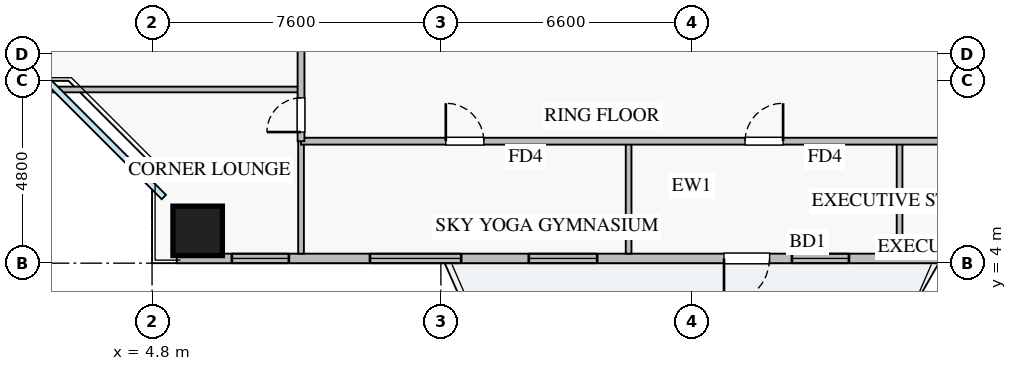
"""IFC4 building model, lengths in metres.
Left out: names, types, materials, properties, quantities, classifications, styles, units other than length and angle.
Written with IfcOpenShell. Run it as: python <this file> out.ifc"""

import sys

from ifc_helpers import new_model, si_unit, direction, frame, frame_2d, origin, origin_2d, place, context, subcontext, project, spatial, rectangle, extrude, source, transform, mapped, element, fill, save


model = new_model("IFC4")
c1 = context("Model", 3, precision=1e-05, world=origin(), true_north=direction((0.0, 1.0)))
c2 = subcontext(c1, "Body", "Model", "MODEL_VIEW")
j1 = project(units=[si_unit("LENGTHUNIT", "METRE"), si_unit("PLANEANGLEUNIT", "RADIAN")], contexts=[c1])
p1 = place(None, origin())
s1 = spatial("IfcSite", under=j1, at=p1, CompositionType="ELEMENT")
p2 = place(p1, origin())
s2 = spatial("IfcBuilding", under=s1, at=p2, CompositionType="ELEMENT")
p3 = place(p2, frame((0.0, 0.0, 86.0)))
s3 = spatial("IfcBuildingStorey", under=s2, at=p3, CompositionType="ELEMENT", Elevation=86.0)
m1 = source(origin(), c2, "Body", "SweptSolid", [
    extrude(rectangle(XDim=1.3, YDim=1.3, at=origin_2d()), origin(), (0.0, 0.0, 1.0), 3.25),
])
p4 = place(p3, frame((6.0, 4.85, 0.0), z_axis=(0.0, 0.0, 1.0), x_axis=(1.0, 0.0, 0.0)))
e1 = element("IfcColumn", 1, at=p4, inside=s3, PredefinedType="COLUMN", context=c2, shape_type="MappedRepresentation", body=[
    mapped(m1, transform((0.0, 0.0, 0.0), x_axis=(1.0, 0.0, 0.0), y_axis=(0.0, 1.0, 0.0), z_axis=(0.0, 0.0, 1.0), scale=1.0)),
])
p5 = place(p3, frame((5.45, 4.125, 0.0), z_axis=(0.0, 0.0, 1.0), x_axis=(1.0, 0.0, 0.0)))
e2 = element("IfcWall", 2, at=p5, inside=s3, PredefinedType="STANDARD", context=c2, shape_type="SweptSolid", body=[
    extrude(rectangle(XDim=27.1, YDim=0.25, at=frame_2d((13.55, 0.0))), origin(), (0.0, 0.0, 1.0), 2.61),
])
p6 = place(p5, frame((14.4, 0.0, 0.0)))
e3 = element("IfcOpeningElement", 3, at=p6, cuts=e2, PredefinedType="OPENING", context=c2, shape_type="SweptSolid", body=[
    extrude(rectangle(XDim=1.2, YDim=2.1, at=frame_2d((0.6, 1.05))), frame((0.0, 0.135, 0.0), z_axis=(0.0, -1.0, 0.0), x_axis=(1.0, 0.0, 0.0)), (0.0, 0.0, 1.0), 0.27),
])
p7 = place(p5, frame((1.45, 0.0, 0.9)))
e4 = element("IfcOpeningElement", 4, at=p7, cuts=e2, PredefinedType="OPENING", context=c2, shape_type="SweptSolid", body=[
    extrude(rectangle(XDim=1.5, YDim=1.5, at=frame_2d((0.75, 0.75))), frame((0.0, 0.135, 0.0), z_axis=(0.0, -1.0, 0.0), x_axis=(1.0, 0.0, 0.0)), (0.0, 0.0, 1.0), 0.27),
])
p8 = place(p5, frame((9.263, 0.0, 0.9)))
e5 = element("IfcOpeningElement", 5, at=p8, cuts=e2, PredefinedType="OPENING", context=c2, shape_type="SweptSolid", body=[
    extrude(rectangle(XDim=1.8, YDim=1.45, at=frame_2d((0.9, 0.725))), frame((0.0, 0.135, 0.0), z_axis=(0.0, -1.0, 0.0), x_axis=(1.0, 0.0, 0.0)), (0.0, 0.0, 1.0), 0.27),
])
p9 = place(p5, frame((16.188, 0.0, 0.9)))
e6 = element("IfcOpeningElement", 6, at=p9, cuts=e2, PredefinedType="OPENING", context=c2, shape_type="SweptSolid", body=[
    extrude(rectangle(XDim=1.5, YDim=1.45, at=frame_2d((0.75, 0.725))), frame((0.0, 0.135, 0.0), z_axis=(0.0, -1.0, 0.0), x_axis=(1.0, 0.0, 0.0)), (0.0, 0.0, 1.0), 0.27),
])
p10 = place(p5, frame((22.663, 0.0, 0.9)))
e7 = element("IfcOpeningElement", 7, at=p10, cuts=e2, PredefinedType="OPENING", context=c2, shape_type="SweptSolid", body=[
    extrude(rectangle(XDim=2.1, YDim=1.48, at=frame_2d((1.05, 0.74))), frame((0.0, 0.135, 0.0), z_axis=(0.0, -1.0, 0.0), x_axis=(1.0, 0.0, 0.0)), (0.0, 0.0, 1.0), 0.27),
])
p11 = place(p5, frame((5.084, 0.0, 0.9)))
e8 = element("IfcOpeningElement", 8, at=p11, cuts=e2, PredefinedType="OPENING", context=c2, shape_type="SweptSolid", body=[
    extrude(rectangle(XDim=2.4, YDim=1.5, at=frame_2d((1.2, 0.75))), frame((0.0, 0.135, 0.0), z_axis=(0.0, -1.0, 0.0), x_axis=(1.0, 0.0, 0.0)), (0.0, 0.0, 1.0), 0.27),
])
for number, where, z_axis, x_axis in (
    (9, (17.34, 4.25, 0.0), (0.0, 0.0, 1.0), (0.0, 1.0, 0.0)),
    (10, (24.47, 4.25, 0.0), (0.0, 0.0, 1.0), (0.0, 1.0, 0.0)),
    (11, (8.72, 4.25, 0.0), (0.0, 0.0, 1.0), (0.0, 1.0, 0.0)),
):
    element("IfcWall", number, at=place(p3, frame(where, z_axis=z_axis, x_axis=x_axis)), inside=s3, PredefinedType="PARTITIONING", context=c2, shape_type="SweptSolid", body=[
        extrude(rectangle(XDim=2.96, YDim=0.15, at=frame_2d((1.48, 0.0))), origin(), (0.0, 0.0, 1.0), 3.07),
    ])
p12 = place(p3, frame((8.72, 7.21, 0.0), z_axis=(0.0, 0.0, 1.0), x_axis=(1.0, 0.0, 0.0)))
e12 = element("IfcWall", 12, at=p12, inside=s3, PredefinedType="PARTITIONING", context=c2, shape_type="SweptSolid", body=[
    extrude(rectangle(XDim=23.63, YDim=0.18, at=frame_2d((11.815, 0.0))), origin(), (0.0, 0.0, 1.0), 3.07),
])
p13 = place(p12, frame((3.81, 0.0, 0.0)))
e13 = element("IfcOpeningElement", 13, at=p13, cuts=e12, PredefinedType="OPENING", context=c2, shape_type="SweptSolid", body=[
    extrude(rectangle(XDim=1.0, YDim=2.05, at=frame_2d((0.5, 1.025))), frame((0.0, 0.1, 0.0), z_axis=(0.0, -1.0, 0.0), x_axis=(1.0, 0.0, 0.0)), (0.0, 0.0, 1.0), 0.2),
])
p14 = place(p12, frame((11.685, 0.0, 0.0)))
e14 = element("IfcOpeningElement", 14, at=p14, cuts=e12, PredefinedType="OPENING", context=c2, shape_type="SweptSolid", body=[
    extrude(rectangle(XDim=1.0, YDim=2.05, at=frame_2d((0.5, 1.025))), frame((0.0, 0.1, 0.0), z_axis=(0.0, -1.0, 0.0), x_axis=(1.0, 0.0, 0.0)), (0.0, 0.0, 1.0), 0.2),
])
p15 = place(p12, frame((19.19, 0.0, 0.0)))
e15 = element("IfcOpeningElement", 15, at=p15, cuts=e12, PredefinedType="OPENING", context=c2, shape_type="SweptSolid", body=[
    extrude(rectangle(XDim=1.0, YDim=2.05, at=frame_2d((0.5, 1.025))), frame((0.0, 0.1, 0.0), z_axis=(0.0, -1.0, 0.0), x_axis=(1.0, 0.0, 0.0)), (0.0, 0.0, 1.0), 0.2),
])
p16 = place(p3, frame((0.25, 8.57, 0.0), z_axis=(0.0, 0.0, 1.0), x_axis=(1.0, 0.0, 0.0)))
e16 = element("IfcWall", 16, at=p16, inside=s3, PredefinedType="PARTITIONING", context=c2, shape_type="SweptSolid", body=[
    extrude(rectangle(XDim=8.47, YDim=0.15, at=frame_2d((4.235, 0.0))), origin(), (0.0, 0.0, 1.0), 3.07),
])
p17 = place(p3, frame((8.72, 7.21, 0.0), z_axis=(0.0, 0.0, 1.0), x_axis=(0.0, 1.0, 0.0)))
e17 = element("IfcWall", 17, at=p17, inside=s3, PredefinedType="PARTITIONING", context=c2, shape_type="SweptSolid", body=[
    extrude(rectangle(XDim=31.23, YDim=0.18, at=frame_2d((15.615, 0.0))), origin(), (0.0, 0.0, 1.0), 3.07),
])
p18 = place(p17, frame((30.09, 0.0, 0.0)))
e18 = element("IfcOpeningElement", 18, at=p18, cuts=e17, PredefinedType="OPENING", context=c2, shape_type="SweptSolid", body=[
    extrude(rectangle(XDim=0.9, YDim=2.05, at=frame_2d((0.45, 1.025))), frame((0.0, 0.1, 0.0), z_axis=(0.0, -1.0, 0.0), x_axis=(1.0, 0.0, 0.0)), (0.0, 0.0, 1.0), 0.2),
])
p19 = place(p17, frame((0.24, 0.0, 0.0)))
e19 = element("IfcOpeningElement", 19, at=p19, cuts=e17, PredefinedType="OPENING", context=c2, shape_type="SweptSolid", body=[
    extrude(rectangle(XDim=0.9, YDim=2.05, at=frame_2d((0.45, 1.025))), frame((0.0, 0.1, 0.0), z_axis=(0.0, -1.0, 0.0), x_axis=(1.0, 0.0, 0.0)), (0.0, 0.0, 1.0), 0.2),
])
p20 = place(p17, frame((3.07, 0.0, 0.0)))
e20 = element("IfcOpeningElement", 20, at=p20, cuts=e17, PredefinedType="OPENING", context=c2, shape_type="SweptSolid", body=[
    extrude(rectangle(XDim=1.0, YDim=2.05, at=frame_2d((0.5, 1.025))), frame((0.0, 0.1, 0.0), z_axis=(0.0, -1.0, 0.0), x_axis=(1.0, 0.0, 0.0)), (0.0, 0.0, 1.0), 0.2),
])
p21 = place(p17, frame((15.37, 0.0, 0.0)))
e21 = element("IfcOpeningElement", 21, at=p21, cuts=e17, PredefinedType="OPENING", context=c2, shape_type="SweptSolid", body=[
    extrude(rectangle(XDim=1.0, YDim=2.05, at=frame_2d((0.5, 1.025))), frame((0.0, 0.1, 0.0), z_axis=(0.0, -1.0, 0.0), x_axis=(1.0, 0.0, 0.0)), (0.0, 0.0, 1.0), 0.2),
])
p22 = place(p17, frame((21.96, 0.0, 0.0)))
e22 = element("IfcOpeningElement", 22, at=p22, cuts=e17, PredefinedType="OPENING", context=c2, shape_type="SweptSolid", body=[
    extrude(rectangle(XDim=1.0, YDim=2.05, at=frame_2d((0.5, 1.025))), frame((0.0, 0.1, 0.0), z_axis=(0.0, -1.0, 0.0), x_axis=(1.0, 0.0, 0.0)), (0.0, 0.0, 1.0), 0.2),
])
m2 = source(origin(), c2, "Body", "SweptSolid", [
    extrude(rectangle(XDim=1.2, YDim=2.1, at=frame_2d((0.6, 1.05))), frame((0.0, 0.025, 0.0), z_axis=(0.0, -1.0, 0.0), x_axis=(1.0, 0.0, 0.0)), (0.0, 0.0, 1.0), 0.05),
])
p23 = place(p6, frame((1.2, 0.0, 0.0), z_axis=(0.0, 0.0, 1.0), x_axis=(-1.0, 0.0, 0.0)))
e23 = element("IfcDoor", 23, at=p23, inside=s3, OperationType="SINGLE_SWING_LEFT", PredefinedType="DOOR", context=c2, shape_type="MappedRepresentation", body=[
    mapped(m2, transform((0.0, 0.0, 0.0), x_axis=(1.0, 0.0, 0.0), y_axis=(0.0, 1.0, 0.0), z_axis=(0.0, 0.0, 1.0), scale=1.0)),
])
fill(e3, e23)
m3 = source(origin(), c2, "Body", "SweptSolid", [
    extrude(rectangle(XDim=1.5, YDim=1.5, at=frame_2d((0.75, 0.75))), frame((0.0, 0.03, 0.0), z_axis=(0.0, -1.0, 0.0), x_axis=(1.0, 0.0, 0.0)), (0.0, 0.0, 1.0), 0.06),
])
p24 = place(p7, origin())
e24 = element("IfcWindow", 24, at=p24, inside=s3, PartitioningType="TRIPLE_PANEL_VERTICAL", PredefinedType="WINDOW", context=c2, shape_type="MappedRepresentation", body=[
    mapped(m3, transform((0.0, 0.0, 0.0), x_axis=(1.0, 0.0, 0.0), y_axis=(0.0, 1.0, 0.0), z_axis=(0.0, 0.0, 1.0), scale=1.0)),
])
fill(e4, e24)
m4 = source(origin(), c2, "Body", "SweptSolid", [
    extrude(rectangle(XDim=1.8, YDim=1.45, at=frame_2d((0.9, 0.725))), frame((0.0, 0.03, 0.0), z_axis=(0.0, -1.0, 0.0), x_axis=(1.0, 0.0, 0.0)), (0.0, 0.0, 1.0), 0.06),
])
p25 = place(p8, origin())
e25 = element("IfcWindow", 25, at=p25, inside=s3, PartitioningType="DOUBLE_PANEL_VERTICAL", PredefinedType="WINDOW", context=c2, shape_type="MappedRepresentation", body=[
    mapped(m4, transform((0.0, 0.0, 0.0), x_axis=(1.0, 0.0, 0.0), y_axis=(0.0, 1.0, 0.0), z_axis=(0.0, 0.0, 1.0), scale=1.0)),
])
fill(e5, e25)
m5 = source(origin(), c2, "Body", "SweptSolid", [
    extrude(rectangle(XDim=1.5, YDim=1.45, at=frame_2d((0.75, 0.725))), frame((0.0, 0.03, 0.0), z_axis=(0.0, -1.0, 0.0), x_axis=(1.0, 0.0, 0.0)), (0.0, 0.0, 1.0), 0.06),
])
p26 = place(p9, origin())
e26 = element("IfcWindow", 26, at=p26, inside=s3, PartitioningType="DOUBLE_PANEL_VERTICAL", PredefinedType="WINDOW", context=c2, shape_type="MappedRepresentation", body=[
    mapped(m5, transform((0.0, 0.0, 0.0), x_axis=(1.0, 0.0, 0.0), y_axis=(0.0, 1.0, 0.0), z_axis=(0.0, 0.0, 1.0), scale=1.0)),
])
fill(e6, e26)
m6 = source(origin(), c2, "Body", "SweptSolid", [
    extrude(rectangle(XDim=1.0, YDim=2.05, at=frame_2d((0.5, 1.025))), frame((0.0, 0.025, 0.0), z_axis=(0.0, -1.0, 0.0), x_axis=(1.0, 0.0, 0.0)), (0.0, 0.0, 1.0), 0.05),
])
p27 = place(p13, origin())
e27 = element("IfcDoor", 27, at=p27, inside=s3, OperationType="SINGLE_SWING_LEFT", PredefinedType="DOOR", context=c2, shape_type="MappedRepresentation", body=[
    mapped(m6, transform((0.0, 0.0, 0.0), x_axis=(1.0, 0.0, 0.0), y_axis=(0.0, 1.0, 0.0), z_axis=(0.0, 0.0, 1.0), scale=1.0)),
])
fill(e13, e27)
p28 = place(p14, origin())
e28 = element("IfcDoor", 28, at=p28, inside=s3, OperationType="SINGLE_SWING_RIGHT", PredefinedType="DOOR", context=c2, shape_type="MappedRepresentation", body=[
    mapped(m6, transform((0.0, 0.0, 0.0), x_axis=(1.0, 0.0, 0.0), y_axis=(0.0, 1.0, 0.0), z_axis=(0.0, 0.0, 1.0), scale=1.0)),
])
fill(e14, e28)
m7 = source(origin(), c2, "Body", "SweptSolid", [
    extrude(rectangle(XDim=0.9, YDim=2.05, at=frame_2d((0.45, 1.025))), frame((0.0, 0.025, 0.0), z_axis=(0.0, -1.0, 0.0), x_axis=(1.0, 0.0, 0.0)), (0.0, 0.0, 1.0), 0.05),
])
p29 = place(p19, origin())
e29 = element("IfcDoor", 29, at=p29, inside=s3, OperationType="SINGLE_SWING_LEFT", PredefinedType="DOOR", context=c2, shape_type="MappedRepresentation", body=[
    mapped(m7, transform((0.0, 0.0, 0.0), x_axis=(1.0, 0.0, 0.0), y_axis=(0.0, 1.0, 0.0), z_axis=(0.0, 0.0, 1.0), scale=1.0)),
])
fill(e19, e29)
m8 = source(origin(), c2, "Body", "SweptSolid", [
    extrude(rectangle(XDim=2.4, YDim=1.5, at=frame_2d((1.2, 0.75))), frame((0.0, 0.03, 0.0), z_axis=(0.0, -1.0, 0.0), x_axis=(1.0, 0.0, 0.0)), (0.0, 0.0, 1.0), 0.06),
])
p30 = place(p11, origin())
e30 = element("IfcWindow", 30, at=p30, inside=s3, PartitioningType="TRIPLE_PANEL_VERTICAL", PredefinedType="WINDOW", context=c2, shape_type="MappedRepresentation", body=[
    mapped(m8, transform((0.0, 0.0, 0.0), x_axis=(1.0, 0.0, 0.0), y_axis=(0.0, 1.0, 0.0), z_axis=(0.0, 0.0, 1.0), scale=1.0)),
])
fill(e8, e30)
save(model, sys.argv[1])
